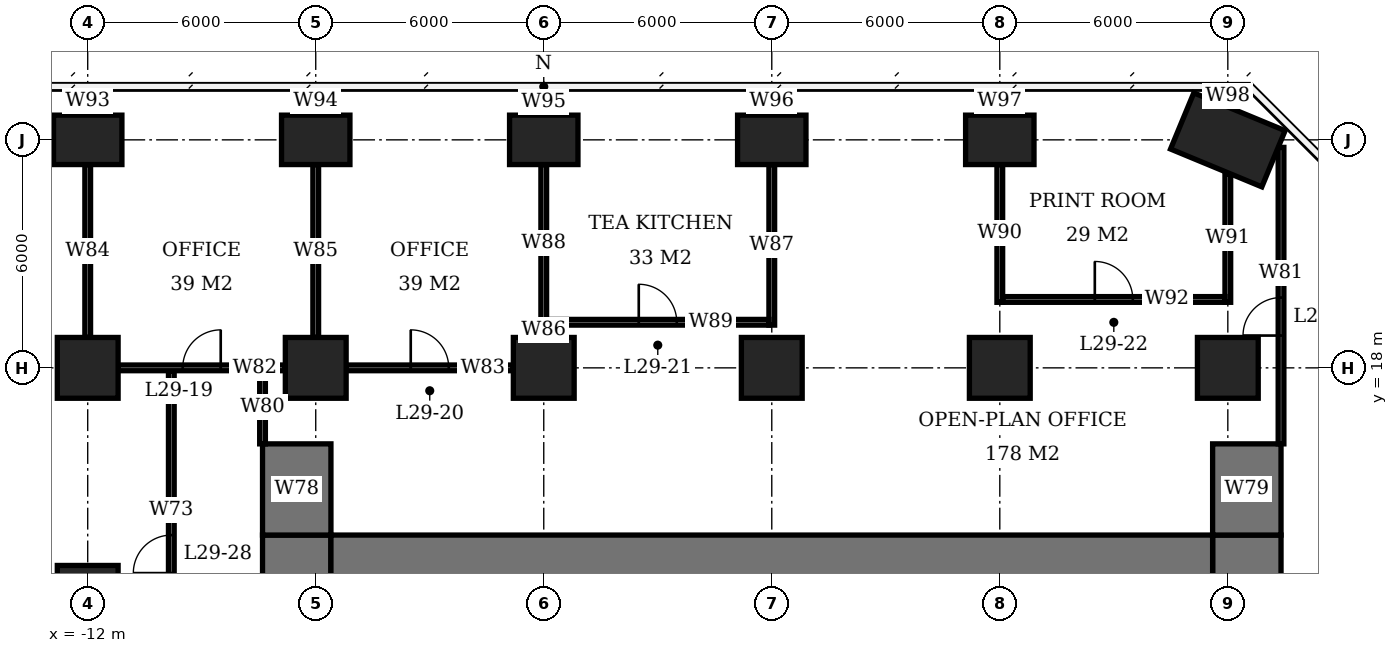
"""IFC4 building model, lengths in metres.
Left out: names, types, materials, properties, quantities, classifications, styles, units other than length and angle.
Written with IfcOpenShell. Run it as: python <this file> out.ifc"""

import sys

from ifc_helpers import new_model, si_unit, direction, frame, frame_2d, origin, origin_2d, place, context, subcontext, project, spatial, rectangle, extrude, element, fill, save


model = new_model("IFC4")
c1 = context("Model", 3, precision=1e-05, world=origin(), true_north=direction((0.0, 1.0)))
c2 = subcontext(c1, "Body", "Model", "MODEL_VIEW")
j1 = project(units=[si_unit("LENGTHUNIT", "METRE"), si_unit("PLANEANGLEUNIT", "RADIAN")], contexts=[c1])
p1 = place(None, origin())
s1 = spatial("IfcSite", under=j1, at=p1, CompositionType="ELEMENT")
p2 = place(p1, origin())
s2 = spatial("IfcBuilding", under=s1, at=p2, CompositionType="ELEMENT")
p3 = place(p2, frame((0.0, 0.0, 121.1)))
s3 = spatial("IfcBuildingStorey", under=s2, at=p3, CompositionType="ELEMENT", Elevation=121.1)
for number, where, z_axis, x_axis in (
    (1, (-12.0, 12.0, 0.0), (0.0, 0.0, 1.0), (1.0, 0.0, 0.0)),
    (2, (-12.0, 18.0, 0.0), (0.0, 0.0, 1.0), (1.0, 0.0, 0.0)),
):
    element("IfcColumn", number, at=place(p3, frame(where, z_axis=z_axis, x_axis=x_axis)), inside=s3, PredefinedType="COLUMN", context=c2, shape_type="SweptSolid", body=[
        extrude(rectangle(XDim=1.6, YDim=1.6, at=origin_2d()), origin(), (0.0, 0.0, 1.0), 3.9),
    ])
p4 = place(p3, frame((-12.0, 24.0, 0.0), z_axis=(0.0, 0.0, 1.0), x_axis=(1.0, 0.0, 0.0)))
e3 = element("IfcColumn", 3, at=p4, inside=s3, PredefinedType="COLUMN", context=c2, shape_type="SweptSolid", body=[
    extrude(rectangle(XDim=1.8, YDim=1.3, at=origin_2d()), origin(), (0.0, 0.0, 1.0), 3.9),
])
p5 = place(p3, frame((-6.0, 18.0, 0.0), z_axis=(0.0, 0.0, 1.0), x_axis=(1.0, 0.0, 0.0)))
e4 = element("IfcColumn", 4, at=p5, inside=s3, PredefinedType="COLUMN", context=c2, shape_type="SweptSolid", body=[
    extrude(rectangle(XDim=1.6, YDim=1.6, at=origin_2d()), origin(), (0.0, 0.0, 1.0), 3.9),
])
p6 = place(p3, frame((-6.0, 24.0, 0.0), z_axis=(0.0, 0.0, 1.0), x_axis=(1.0, 0.0, 0.0)))
e5 = element("IfcColumn", 5, at=p6, inside=s3, PredefinedType="COLUMN", context=c2, shape_type="SweptSolid", body=[
    extrude(rectangle(XDim=1.8, YDim=1.3, at=origin_2d()), origin(), (0.0, 0.0, 1.0), 3.9),
])
p7 = place(p3, frame((0.0, 18.0, 0.0), z_axis=(0.0, 0.0, 1.0), x_axis=(1.0, 0.0, 0.0)))
e6 = element("IfcColumn", 6, at=p7, inside=s3, PredefinedType="COLUMN", context=c2, shape_type="SweptSolid", body=[
    extrude(rectangle(XDim=1.6, YDim=1.6, at=origin_2d()), origin(), (0.0, 0.0, 1.0), 3.9),
])
p8 = place(p3, frame((0.0, 24.0, 0.0), z_axis=(0.0, 0.0, 1.0), x_axis=(1.0, 0.0, 0.0)))
e7 = element("IfcColumn", 7, at=p8, inside=s3, PredefinedType="COLUMN", context=c2, shape_type="SweptSolid", body=[
    extrude(rectangle(XDim=1.8, YDim=1.3, at=origin_2d()), origin(), (0.0, 0.0, 1.0), 3.9),
])
p9 = place(p3, frame((6.0, 18.0, 0.0), z_axis=(0.0, 0.0, 1.0), x_axis=(1.0, 0.0, 0.0)))
e8 = element("IfcColumn", 8, at=p9, inside=s3, PredefinedType="COLUMN", context=c2, shape_type="SweptSolid", body=[
    extrude(rectangle(XDim=1.6, YDim=1.6, at=origin_2d()), origin(), (0.0, 0.0, 1.0), 3.9),
])
p10 = place(p3, frame((6.0, 24.0, 0.0), z_axis=(0.0, 0.0, 1.0), x_axis=(1.0, 0.0, 0.0)))
e9 = element("IfcColumn", 9, at=p10, inside=s3, PredefinedType="COLUMN", context=c2, shape_type="SweptSolid", body=[
    extrude(rectangle(XDim=1.8, YDim=1.3, at=origin_2d()), origin(), (0.0, 0.0, 1.0), 3.9),
])
p11 = place(p3, frame((12.0, 18.0, 0.0), z_axis=(0.0, 0.0, 1.0), x_axis=(1.0, 0.0, 0.0)))
e10 = element("IfcColumn", 10, at=p11, inside=s3, PredefinedType="COLUMN", context=c2, shape_type="SweptSolid", body=[
    extrude(rectangle(XDim=1.6, YDim=1.6, at=origin_2d()), origin(), (0.0, 0.0, 1.0), 3.9),
])
p12 = place(p3, frame((12.0, 24.0, 0.0), z_axis=(0.0, 0.0, 1.0), x_axis=(1.0, 0.0, 0.0)))
e11 = element("IfcColumn", 11, at=p12, inside=s3, PredefinedType="COLUMN", context=c2, shape_type="SweptSolid", body=[
    extrude(rectangle(XDim=1.8, YDim=1.3, at=origin_2d()), origin(), (0.0, 0.0, 1.0), 3.9),
])
p13 = place(p3, frame((18.0, 18.0, 0.0), z_axis=(0.0, 0.0, 1.0), x_axis=(1.0, 0.0, 0.0)))
e12 = element("IfcColumn", 12, at=p13, inside=s3, PredefinedType="COLUMN", context=c2, shape_type="SweptSolid", body=[
    extrude(rectangle(XDim=1.6, YDim=1.6, at=origin_2d()), origin(), (0.0, 0.0, 1.0), 3.9),
])
p14 = place(p3, frame((18.0, 24.0, 0.0), z_axis=(0.0, 0.0, 1.0), x_axis=(0.923879532511, -0.382683432365, 0.0)))
e13 = element("IfcColumn", 13, at=p14, inside=s3, PredefinedType="COLUMN", context=c2, shape_type="SweptSolid", body=[
    extrude(rectangle(XDim=2.6, YDim=1.6, at=origin_2d()), origin(), (0.0, 0.0, 1.0), 3.9),
])
p15 = place(p3, frame((-5.6, 12.6, 0.0), z_axis=(0.0, 0.0, 1.0), x_axis=(1.0, 0.0, 0.0)))
e14 = element("IfcWall", 14, at=p15, inside=s3, PredefinedType="SHEAR", context=c2, shape_type="SweptSolid", body=[
    extrude(rectangle(XDim=23.2, YDim=2.0, at=frame_2d((11.6, 0.0))), origin(), (0.0, 0.0, 1.0), 3.9),
])
p16 = place(p3, frame((-6.5, -7.6, 0.0), z_axis=(0.0, 0.0, 1.0), x_axis=(0.0, 1.0, 0.0)))
e15 = element("IfcWall", 15, at=p16, inside=s3, PredefinedType="SHEAR", context=c2, shape_type="SweptSolid", body=[
    extrude(rectangle(XDim=21.2, YDim=1.8, at=frame_2d((10.6, 0.0))), origin(), (0.0, 0.0, 1.0), 3.9),
])
p17 = place(p16, frame((7.8, 0.0, 0.0)))
e16 = element("IfcOpeningElement", 16, at=p17, cuts=e15, PredefinedType="OPENING", context=c2, shape_type="SweptSolid", body=[
    extrude(rectangle(XDim=1.8, YDim=2.4, at=frame_2d((0.9, 1.2))), frame((0.0, 0.91, 0.0), z_axis=(0.0, -1.0, 0.0), x_axis=(1.0, 0.0, 0.0)), (0.0, 0.0, 1.0), 1.82),
])
p18 = place(p3, frame((18.5, -7.6, 0.0), z_axis=(0.0, 0.0, 1.0), x_axis=(0.0, 1.0, 0.0)))
e17 = element("IfcWall", 17, at=p18, inside=s3, PredefinedType="SHEAR", context=c2, shape_type="SweptSolid", body=[
    extrude(rectangle(XDim=21.2, YDim=1.8, at=frame_2d((10.6, 0.0))), origin(), (0.0, 0.0, 1.0), 3.9),
])
p19 = place(p18, frame((9.2, 0.0, 0.0)))
e18 = element("IfcOpeningElement", 18, at=p19, cuts=e17, PredefinedType="OPENING", context=c2, shape_type="SweptSolid", body=[
    extrude(rectangle(XDim=1.8, YDim=2.4, at=frame_2d((0.9, 1.2))), frame((0.0, 0.91, 0.0), z_axis=(0.0, -1.0, 0.0), x_axis=(1.0, 0.0, 0.0)), (0.0, 0.0, 1.0), 1.82),
])
for number, where, z_axis, x_axis in (
    (19, (-6.5, 13.6, 0.0), (0.0, 0.0, 1.0), (0.0, 1.0, 0.0)),
    (20, (18.5, 13.6, 0.0), (0.0, 0.0, 1.0), (0.0, 1.0, 0.0)),
):
    element("IfcWall", number, at=place(p3, frame(where, z_axis=z_axis, x_axis=x_axis)), inside=s3, PredefinedType="SHEAR", context=c2, shape_type="SweptSolid", body=[
        extrude(rectangle(XDim=2.4, YDim=1.8, at=frame_2d((1.2, 0.0))), origin(), (0.0, 0.0, 1.0), 3.9),
    ])
p20 = place(p3, frame((-11.2, 18.0, 0.0), z_axis=(0.0, 0.0, 1.0), x_axis=(1.0, 0.0, 0.0)))
e21 = element("IfcWall", 21, at=p20, inside=s3, PredefinedType="PARTITIONING", context=c2, shape_type="SweptSolid", body=[
    extrude(rectangle(XDim=4.4, YDim=0.15, at=frame_2d((2.2, 0.0))), origin(), (0.0, 0.0, 1.0), 3.65),
])
p21 = place(p20, frame((1.7, 0.0, 0.0)))
e22 = element("IfcOpeningElement", 22, at=p21, cuts=e21, PredefinedType="OPENING", context=c2, shape_type="SweptSolid", body=[
    extrude(rectangle(XDim=1.0, YDim=2.1, at=frame_2d((0.5, 1.05))), frame((0.0, 0.085, 0.0), z_axis=(0.0, -1.0, 0.0), x_axis=(1.0, 0.0, 0.0)), (0.0, 0.0, 1.0), 0.17),
])
p22 = place(p3, frame((-5.2, 18.0, 0.0), z_axis=(0.0, 0.0, 1.0), x_axis=(1.0, 0.0, 0.0)))
e23 = element("IfcWall", 23, at=p22, inside=s3, PredefinedType="PARTITIONING", context=c2, shape_type="SweptSolid", body=[
    extrude(rectangle(XDim=4.4, YDim=0.15, at=frame_2d((2.2, 0.0))), origin(), (0.0, 0.0, 1.0), 3.65),
])
p23 = place(p22, frame((1.7, 0.0, 0.0)))
e24 = element("IfcOpeningElement", 24, at=p23, cuts=e23, PredefinedType="OPENING", context=c2, shape_type="SweptSolid", body=[
    extrude(rectangle(XDim=1.0, YDim=2.1, at=frame_2d((0.5, 1.05))), frame((0.0, 0.085, 0.0), z_axis=(0.0, -1.0, 0.0), x_axis=(1.0, 0.0, 0.0)), (0.0, 0.0, 1.0), 0.17),
])
p24 = place(p3, frame((0.075, 19.2, 0.0), z_axis=(0.0, 0.0, 1.0), x_axis=(1.0, 0.0, 0.0)))
e25 = element("IfcWall", 25, at=p24, inside=s3, PredefinedType="PARTITIONING", context=c2, shape_type="SweptSolid", body=[
    extrude(rectangle(XDim=5.85, YDim=0.15, at=frame_2d((2.925, 0.0))), origin(), (0.0, 0.0, 1.0), 3.65),
])
p25 = place(p24, frame((2.425, 0.0, 0.0)))
e26 = element("IfcOpeningElement", 26, at=p25, cuts=e25, PredefinedType="OPENING", context=c2, shape_type="SweptSolid", body=[
    extrude(rectangle(XDim=1.0, YDim=2.1, at=frame_2d((0.5, 1.05))), frame((0.0, 0.085, 0.0), z_axis=(0.0, -1.0, 0.0), x_axis=(1.0, 0.0, 0.0)), (0.0, 0.0, 1.0), 0.17),
])
p26 = place(p3, frame((12.075, 19.8, 0.0), z_axis=(0.0, 0.0, 1.0), x_axis=(1.0, 0.0, 0.0)))
e27 = element("IfcWall", 27, at=p26, inside=s3, PredefinedType="PARTITIONING", context=c2, shape_type="SweptSolid", body=[
    extrude(rectangle(XDim=5.85, YDim=0.15, at=frame_2d((2.925, 0.0))), origin(), (0.0, 0.0, 1.0), 3.65),
])
p27 = place(p26, frame((2.425, 0.0, 0.0)))
e28 = element("IfcOpeningElement", 28, at=p27, cuts=e27, PredefinedType="OPENING", context=c2, shape_type="SweptSolid", body=[
    extrude(rectangle(XDim=1.0, YDim=2.1, at=frame_2d((0.5, 1.05))), frame((0.0, 0.085, 0.0), z_axis=(0.0, -1.0, 0.0), x_axis=(1.0, 0.0, 0.0)), (0.0, 0.0, 1.0), 0.17),
])
p28 = place(p3, frame((-12.0, 18.8, 0.0), z_axis=(0.0, 0.0, 1.0), x_axis=(0.0, 1.0, 0.0)))
e29 = element("IfcWall", 29, at=p28, inside=s3, PredefinedType="PARTITIONING", context=c2, shape_type="SweptSolid", body=[
    extrude(rectangle(XDim=4.55, YDim=0.15, at=frame_2d((2.275, 0.0))), origin(), (0.0, 0.0, 1.0), 3.65),
])
p29 = place(p3, frame((-12.0, 24.65, 0.0), z_axis=(0.0, 0.0, 1.0), x_axis=(0.0, 1.0, 0.0)))
e30 = element("IfcWall", 30, at=p29, inside=s3, PredefinedType="PARTITIONING", context=c2, shape_type="SweptSolid", body=[
    extrude(rectangle(XDim=0.75, YDim=0.15, at=frame_2d((0.375, 0.0))), origin(), (0.0, 0.0, 1.0), 3.65),
])
p30 = place(p3, frame((-6.0, 18.8, 0.0), z_axis=(0.0, 0.0, 1.0), x_axis=(0.0, 1.0, 0.0)))
e31 = element("IfcWall", 31, at=p30, inside=s3, PredefinedType="PARTITIONING", context=c2, shape_type="SweptSolid", body=[
    extrude(rectangle(XDim=4.55, YDim=0.15, at=frame_2d((2.275, 0.0))), origin(), (0.0, 0.0, 1.0), 3.65),
])
p31 = place(p3, frame((-6.0, 24.65, 0.0), z_axis=(0.0, 0.0, 1.0), x_axis=(0.0, 1.0, 0.0)))
e32 = element("IfcWall", 32, at=p31, inside=s3, PredefinedType="PARTITIONING", context=c2, shape_type="SweptSolid", body=[
    extrude(rectangle(XDim=0.75, YDim=0.15, at=frame_2d((0.375, 0.0))), origin(), (0.0, 0.0, 1.0), 3.65),
])
p32 = place(p3, frame((0.0, 18.8, 0.0), z_axis=(0.0, 0.0, 1.0), x_axis=(0.0, 1.0, 0.0)))
e33 = element("IfcWall", 33, at=p32, inside=s3, PredefinedType="PARTITIONING", context=c2, shape_type="SweptSolid", body=[
    extrude(rectangle(XDim=0.4, YDim=0.15, at=frame_2d((0.2, 0.0))), origin(), (0.0, 0.0, 1.0), 3.65),
])
p33 = place(p3, frame((0.0, 19.2, 0.0), z_axis=(0.0, 0.0, 1.0), x_axis=(0.0, 1.0, 0.0)))
e34 = element("IfcWall", 34, at=p33, inside=s3, PredefinedType="PARTITIONING", context=c2, shape_type="SweptSolid", body=[
    extrude(rectangle(XDim=4.15, YDim=0.15, at=frame_2d((2.075, 0.0))), origin(), (0.0, 0.0, 1.0), 3.65),
])
p34 = place(p3, frame((0.0, 24.65, 0.0), z_axis=(0.0, 0.0, 1.0), x_axis=(0.0, 1.0, 0.0)))
e35 = element("IfcWall", 35, at=p34, inside=s3, PredefinedType="PARTITIONING", context=c2, shape_type="SweptSolid", body=[
    extrude(rectangle(XDim=0.7, YDim=0.15, at=frame_2d((0.35, 0.0))), origin(), (0.0, 0.0, 1.0), 3.65),
])
p35 = place(p3, frame((6.0, 19.125, 0.0), z_axis=(0.0, 0.0, 1.0), x_axis=(0.0, 1.0, 0.0)))
e36 = element("IfcWall", 36, at=p35, inside=s3, PredefinedType="PARTITIONING", context=c2, shape_type="SweptSolid", body=[
    extrude(rectangle(XDim=4.225, YDim=0.15, at=frame_2d((2.113, 0.0))), origin(), (0.0, 0.0, 1.0), 3.65),
])
p36 = place(p3, frame((6.0, 24.65, 0.0), z_axis=(0.0, 0.0, 1.0), x_axis=(0.0, 1.0, 0.0)))
e37 = element("IfcWall", 37, at=p36, inside=s3, PredefinedType="PARTITIONING", context=c2, shape_type="SweptSolid", body=[
    extrude(rectangle(XDim=0.75, YDim=0.15, at=frame_2d((0.375, 0.0))), origin(), (0.0, 0.0, 1.0), 3.65),
])
p37 = place(p3, frame((12.0, 19.725, 0.0), z_axis=(0.0, 0.0, 1.0), x_axis=(0.0, 1.0, 0.0)))
e38 = element("IfcWall", 38, at=p37, inside=s3, PredefinedType="PARTITIONING", context=c2, shape_type="SweptSolid", body=[
    extrude(rectangle(XDim=3.625, YDim=0.15, at=frame_2d((1.812, 0.0))), origin(), (0.0, 0.0, 1.0), 3.65),
])
p38 = place(p3, frame((12.0, 24.65, 0.0), z_axis=(0.0, 0.0, 1.0), x_axis=(0.0, 1.0, 0.0)))
e39 = element("IfcWall", 39, at=p38, inside=s3, PredefinedType="PARTITIONING", context=c2, shape_type="SweptSolid", body=[
    extrude(rectangle(XDim=0.75, YDim=0.15, at=frame_2d((0.375, 0.0))), origin(), (0.0, 0.0, 1.0), 3.65),
])
p39 = place(p3, frame((18.0, 19.725, 0.0), z_axis=(0.0, 0.0, 1.0), x_axis=(0.0, 1.0, 0.0)))
e40 = element("IfcWall", 40, at=p39, inside=s3, PredefinedType="PARTITIONING", context=c2, shape_type="SweptSolid", body=[
    extrude(rectangle(XDim=3.378, YDim=0.15, at=frame_2d((1.689, 0.0))), origin(), (0.0, 0.0, 1.0), 3.65),
])
p40 = place(p3, frame((18.0, 24.897, 0.0), z_axis=(0.0, 0.0, 1.0), x_axis=(0.0, 1.0, 0.0)))
e41 = element("IfcWall", 41, at=p40, inside=s3, PredefinedType="PARTITIONING", context=c2, shape_type="SweptSolid", body=[
    extrude(rectangle(XDim=0.503, YDim=0.15, at=frame_2d((0.251, 0.0))), origin(), (0.0, 0.0, 1.0), 3.65),
])
p41 = place(p3, frame((-9.8, 10.575, 0.0), z_axis=(0.0, 0.0, 1.0), x_axis=(0.0, 1.0, 0.0)))
e42 = element("IfcWall", 42, at=p41, inside=s3, PredefinedType="PARTITIONING", context=c2, shape_type="SweptSolid", body=[
    extrude(rectangle(XDim=7.35, YDim=0.15, at=frame_2d((3.675, 0.0))), origin(), (0.0, 0.0, 1.0), 3.65),
])
p42 = place(p41, frame((2.024, 0.0, 0.0)))
e43 = element("IfcOpeningElement", 43, at=p42, cuts=e42, PredefinedType="OPENING", context=c2, shape_type="SweptSolid", body=[
    extrude(rectangle(XDim=1.0, YDim=2.1, at=frame_2d((0.5, 1.05))), frame((0.0, 0.085, 0.0), z_axis=(0.0, -1.0, 0.0), x_axis=(1.0, 0.0, 0.0)), (0.0, 0.0, 1.0), 0.17),
])
p43 = place(p3, frame((-7.4, 16.0, 0.0), z_axis=(0.0, 0.0, 1.0), x_axis=(0.0, 1.0, 0.0)))
e44 = element("IfcWall", 44, at=p43, inside=s3, PredefinedType="PARTITIONING", context=c2, shape_type="SweptSolid", body=[
    extrude(rectangle(XDim=1.925, YDim=0.15, at=frame_2d((0.962, 0.0))), origin(), (0.0, 0.0, 1.0), 3.65),
])
p44 = place(p3, frame((19.4, 16.0, 0.0), z_axis=(0.0, 0.0, 1.0), x_axis=(0.0, 1.0, 0.0)))
e45 = element("IfcWall", 45, at=p44, inside=s3, PredefinedType="PARTITIONING", context=c2, shape_type="SweptSolid", body=[
    extrude(rectangle(XDim=7.802, YDim=0.15, at=frame_2d((3.901, 0.0))), origin(), (0.0, 0.0, 1.0), 3.65),
])
p45 = place(p44, frame((2.85, 0.0, 0.0)))
e46 = element("IfcOpeningElement", 46, at=p45, cuts=e45, PredefinedType="OPENING", context=c2, shape_type="SweptSolid", body=[
    extrude(rectangle(XDim=1.0, YDim=2.1, at=frame_2d((0.5, 1.05))), frame((0.0, 0.085, 0.0), z_axis=(0.0, -1.0, 0.0), x_axis=(1.0, 0.0, 0.0)), (0.0, 0.0, 1.0), 0.17),
])
p46 = place(p21, origin())
e47 = element("IfcDoor", 47, at=p46, inside=s3, OperationType="SINGLE_SWING_RIGHT", PredefinedType="DOOR", context=c2, shape_type="SweptSolid", body=[
    extrude(rectangle(XDim=1.0, YDim=2.1, at=frame_2d((0.5, 1.05))), frame((0.0, 0.025, 0.0), z_axis=(0.0, -1.0, 0.0), x_axis=(1.0, 0.0, 0.0)), (0.0, 0.0, 1.0), 0.05),
])
fill(e22, e47)
p47 = place(p23, origin())
e48 = element("IfcDoor", 48, at=p47, inside=s3, OperationType="SINGLE_SWING_LEFT", PredefinedType="DOOR", context=c2, shape_type="SweptSolid", body=[
    extrude(rectangle(XDim=1.0, YDim=2.1, at=frame_2d((0.5, 1.05))), frame((0.0, 0.025, 0.0), z_axis=(0.0, -1.0, 0.0), x_axis=(1.0, 0.0, 0.0)), (0.0, 0.0, 1.0), 0.05),
])
fill(e24, e48)
p48 = place(p25, origin())
e49 = element("IfcDoor", 49, at=p48, inside=s3, OperationType="SINGLE_SWING_LEFT", PredefinedType="DOOR", context=c2, shape_type="SweptSolid", body=[
    extrude(rectangle(XDim=1.0, YDim=2.1, at=frame_2d((0.5, 1.05))), frame((0.0, 0.025, 0.0), z_axis=(0.0, -1.0, 0.0), x_axis=(1.0, 0.0, 0.0)), (0.0, 0.0, 1.0), 0.05),
])
fill(e26, e49)
p49 = place(p27, origin())
e50 = element("IfcDoor", 50, at=p49, inside=s3, OperationType="SINGLE_SWING_LEFT", PredefinedType="DOOR", context=c2, shape_type="SweptSolid", body=[
    extrude(rectangle(XDim=1.0, YDim=2.1, at=frame_2d((0.5, 1.05))), frame((0.0, 0.025, 0.0), z_axis=(0.0, -1.0, 0.0), x_axis=(1.0, 0.0, 0.0)), (0.0, 0.0, 1.0), 0.05),
])
fill(e28, e50)
p50 = place(p42, origin())
e51 = element("IfcDoor", 51, at=p50, inside=s3, OperationType="SINGLE_SWING_LEFT", PredefinedType="DOOR", context=c2, shape_type="SweptSolid", body=[
    extrude(rectangle(XDim=1.0, YDim=2.1, at=frame_2d((0.5, 1.05))), frame((0.0, 0.025, 0.0), z_axis=(0.0, -1.0, 0.0), x_axis=(1.0, 0.0, 0.0)), (0.0, 0.0, 1.0), 0.05),
])
fill(e43, e51)
p51 = place(p45, origin())
e52 = element("IfcDoor", 52, at=p51, inside=s3, OperationType="SINGLE_SWING_LEFT", PredefinedType="DOOR", context=c2, shape_type="SweptSolid", body=[
    extrude(rectangle(XDim=1.0, YDim=2.1, at=frame_2d((0.5, 1.05))), frame((0.0, 0.025, 0.0), z_axis=(0.0, -1.0, 0.0), x_axis=(1.0, 0.0, 0.0)), (0.0, 0.0, 1.0), 0.05),
])
fill(e46, e52)
save(model, sys.argv[1])
